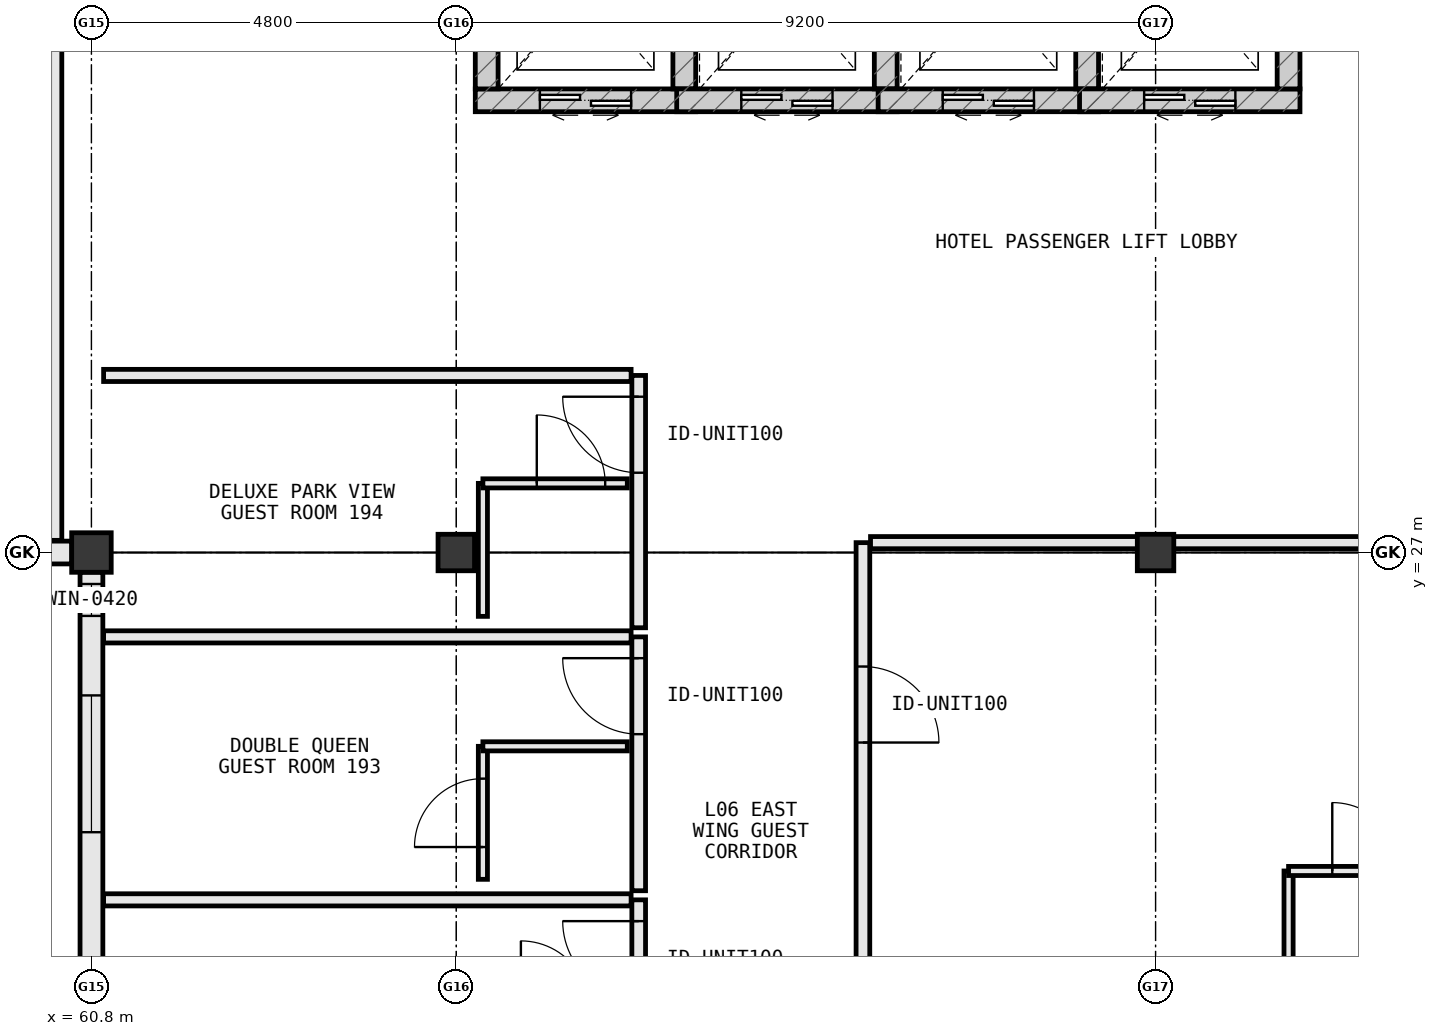
"""IFC4 building model, lengths in metres.
Left out: names, types, materials, properties, quantities, classifications, styles, units other than length and angle.
Written with IfcOpenShell. Run it as: python <this file> out.ifc"""

import sys

from ifc_helpers import new_model, si_unit, direction, frame, frame_2d, origin, origin_2d, place, context, subcontext, project, spatial, rectangle, extrude, element, fill, save


model = new_model("IFC4")
c1 = context("Model", 3, precision=1e-05, world=origin(), true_north=direction((0.0, 1.0)))
c2 = subcontext(c1, "Body", "Model", "MODEL_VIEW")
j1 = project(units=[si_unit("LENGTHUNIT", "METRE"), si_unit("PLANEANGLEUNIT", "RADIAN")], contexts=[c1])
p1 = place(None, origin())
s1 = spatial("IfcSite", under=j1, at=p1, CompositionType="ELEMENT")
p2 = place(p1, origin())
s2 = spatial("IfcBuilding", under=s1, at=p2, CompositionType="ELEMENT")
p3 = place(p2, frame((0.0, 0.0, 27.6)))
s3 = spatial("IfcBuildingStorey", under=s2, at=p3, CompositionType="ELEMENT", Elevation=27.6)
p4 = place(p3, frame((60.8, 27.0, 0.0), z_axis=(0.0, 0.0, 1.0), x_axis=(1.0, 0.0, 0.0)))
e1 = element("IfcColumn", 1, at=p4, inside=s3, PredefinedType="COLUMN", context=c2, shape_type="SweptSolid", body=[
    extrude(rectangle(XDim=0.52, YDim=0.52, at=origin_2d()), origin(), (0.0, 0.0, 1.0), 3.8),
])
for number, where, z_axis, x_axis in (
    (2, (74.8, 27.0, 0.0), (0.0, 0.0, 1.0), (1.0, 0.0, 0.0)),
    (3, (65.6, 27.0, 0.0), (0.0, 0.0, 1.0), (1.0, 0.0, 0.0)),
):
    element("IfcColumn", number, at=place(p3, frame(where, z_axis=z_axis, x_axis=x_axis)), inside=s3, PredefinedType="COLUMN", context=c2, shape_type="SweptSolid", body=[
        extrude(rectangle(XDim=0.48, YDim=0.48, at=origin_2d()), origin(), (0.0, 0.0, 1.0), 3.8),
    ])
p5 = place(p3, frame((51.423, 27.0, 0.0), z_axis=(0.0, 0.0, 1.0), x_axis=(1.0, 0.0, 0.0)))
e4 = element("IfcWall", 4, at=p5, inside=s3, PredefinedType="STANDARD", context=c2, shape_type="SweptSolid", body=[
    extrude(rectangle(XDim=9.119, YDim=0.3, at=frame_2d((4.56, 0.0))), origin(), (0.0, 0.0, 1.0), 2.83),
])
p6 = place(p5, frame((1.68, 0.0, 0.85)))
e5 = element("IfcOpeningElement", 5, at=p6, cuts=e4, PredefinedType="OPENING", context=c2, shape_type="SweptSolid", body=[
    extrude(rectangle(XDim=1.2, YDim=1.55, at=frame_2d((0.6, 0.775))), frame((0.0, 0.162, 0.0), z_axis=(0.0, -1.0, 0.0), x_axis=(1.0, 0.0, 0.0)), (0.0, 0.0, 1.0), 0.324),
])
p7 = place(p5, frame((6.239, 0.0, 0.85)))
e6 = element("IfcOpeningElement", 6, at=p7, cuts=e4, PredefinedType="OPENING", context=c2, shape_type="SweptSolid", body=[
    extrude(rectangle(XDim=1.2, YDim=1.55, at=frame_2d((0.6, 0.775))), frame((0.0, 0.162, 0.0), z_axis=(0.0, -1.0, 0.0), x_axis=(1.0, 0.0, 0.0)), (0.0, 0.0, 1.0), 0.324),
])
p8 = place(p3, frame((60.8, 26.742, 0.0), z_axis=(0.0, 0.0, 1.0), x_axis=(0.0, -1.0, 0.0)))
e7 = element("IfcWall", 7, at=p8, inside=s3, PredefinedType="STANDARD", context=c2, shape_type="SweptSolid", body=[
    extrude(rectangle(XDim=7.884, YDim=0.3, at=frame_2d((3.942, 0.0))), origin(), (0.0, 0.0, 1.0), 3.01),
])
p9 = place(p8, frame((5.082, 0.0, 0.85)))
e8 = element("IfcOpeningElement", 8, at=p9, cuts=e7, PredefinedType="OPENING", context=c2, shape_type="SweptSolid", body=[
    extrude(rectangle(XDim=1.8, YDim=1.85, at=frame_2d((0.9, 0.925))), frame((0.0, 0.162, 0.0), z_axis=(0.0, -1.0, 0.0), x_axis=(1.0, 0.0, 0.0)), (0.0, 0.0, 1.0), 0.324),
])
p10 = place(p8, frame((1.622, 0.0, 0.85)))
e9 = element("IfcOpeningElement", 9, at=p10, cuts=e7, PredefinedType="OPENING", context=c2, shape_type="SweptSolid", body=[
    extrude(rectangle(XDim=1.8, YDim=1.85, at=frame_2d((0.9, 0.925))), frame((0.0, 0.162, 0.0), z_axis=(0.0, -1.0, 0.0), x_axis=(1.0, 0.0, 0.0)), (0.0, 0.0, 1.0), 0.324),
])
p11 = place(p8, frame((0.156, 0.0, 0.85)))
e10 = element("IfcOpeningElement", 10, at=p11, cuts=e7, PredefinedType="OPENING", context=c2, shape_type="SweptSolid", body=[
    extrude(rectangle(XDim=0.42, YDim=1.4, at=frame_2d((0.21, 0.7))), frame((0.0, 0.162, 0.0), z_axis=(0.0, -1.0, 0.0), x_axis=(1.0, 0.0, 0.0)), (0.0, 0.0, 1.0), 0.324),
])
p12 = place(p3, frame((65.85, 32.95, 0.0), z_axis=(0.0, 0.0, 1.0), x_axis=(1.0, 0.0, 0.0)))
e11 = element("IfcWall", 11, at=p12, inside=s3, PredefinedType="SHEAR", context=c2, shape_type="SweptSolid", body=[
    extrude(rectangle(XDim=2.9, YDim=0.3, at=frame_2d((1.45, 0.0))), origin(), (0.0, 0.0, 1.0), 3.8),
])
p13 = place(p12, frame((0.85, 0.0, 0.0)))
e12 = element("IfcOpeningElement", 12, at=p13, cuts=e11, PredefinedType="OPENING", context=c2, shape_type="SweptSolid", body=[
    extrude(rectangle(XDim=1.2, YDim=2.2, at=frame_2d((0.6, 1.1))), frame((0.0, 0.162, 0.0), z_axis=(0.0, -1.0, 0.0), x_axis=(1.0, 0.0, 0.0)), (0.0, 0.0, 1.0), 0.324),
])
for number, where, z_axis, x_axis in (
    (13, (68.6, 33.1, 0.0), (0.0, 0.0, 1.0), (0.0, 1.0, 0.0)),
    (14, (66.0, 35.7, 0.0), (0.0, 0.0, 1.0), (0.0, -1.0, 0.0)),
):
    element("IfcWall", number, at=place(p3, frame(where, z_axis=z_axis, x_axis=x_axis)), inside=s3, PredefinedType="SHEAR", context=c2, shape_type="SweptSolid", body=[
        extrude(rectangle(XDim=2.6, YDim=0.3, at=frame_2d((1.3, 0.0))), origin(), (0.0, 0.0, 1.0), 3.8),
    ])
p14 = place(p3, frame((68.5, 32.95, 0.0), z_axis=(0.0, 0.0, 1.0), x_axis=(1.0, 0.0, 0.0)))
e15 = element("IfcWall", 15, at=p14, inside=s3, PredefinedType="SHEAR", context=c2, shape_type="SweptSolid", body=[
    extrude(rectangle(XDim=2.9, YDim=0.3, at=frame_2d((1.45, 0.0))), origin(), (0.0, 0.0, 1.0), 3.8),
])
p15 = place(p14, frame((0.85, 0.0, 0.0)))
e16 = element("IfcOpeningElement", 16, at=p15, cuts=e15, PredefinedType="OPENING", context=c2, shape_type="SweptSolid", body=[
    extrude(rectangle(XDim=1.2, YDim=2.2, at=frame_2d((0.6, 1.1))), frame((0.0, 0.162, 0.0), z_axis=(0.0, -1.0, 0.0), x_axis=(1.0, 0.0, 0.0)), (0.0, 0.0, 1.0), 0.324),
])
p16 = place(p3, frame((71.25, 33.1, 0.0), z_axis=(0.0, 0.0, 1.0), x_axis=(0.0, 1.0, 0.0)))
e17 = element("IfcWall", 17, at=p16, inside=s3, PredefinedType="SHEAR", context=c2, shape_type="SweptSolid", body=[
    extrude(rectangle(XDim=2.6, YDim=0.3, at=frame_2d((1.3, 0.0))), origin(), (0.0, 0.0, 1.0), 3.8),
])
p17 = place(p3, frame((71.15, 32.95, 0.0), z_axis=(0.0, 0.0, 1.0), x_axis=(1.0, 0.0, 0.0)))
e18 = element("IfcWall", 18, at=p17, inside=s3, PredefinedType="SHEAR", context=c2, shape_type="SweptSolid", body=[
    extrude(rectangle(XDim=2.9, YDim=0.3, at=frame_2d((1.45, 0.0))), origin(), (0.0, 0.0, 1.0), 3.8),
])
p18 = place(p17, frame((0.85, 0.0, 0.0)))
e19 = element("IfcOpeningElement", 19, at=p18, cuts=e18, PredefinedType="OPENING", context=c2, shape_type="SweptSolid", body=[
    extrude(rectangle(XDim=1.2, YDim=2.2, at=frame_2d((0.6, 1.1))), frame((0.0, 0.162, 0.0), z_axis=(0.0, -1.0, 0.0), x_axis=(1.0, 0.0, 0.0)), (0.0, 0.0, 1.0), 0.324),
])
p19 = place(p3, frame((73.9, 33.1, 0.0), z_axis=(0.0, 0.0, 1.0), x_axis=(0.0, 1.0, 0.0)))
e20 = element("IfcWall", 20, at=p19, inside=s3, PredefinedType="SHEAR", context=c2, shape_type="SweptSolid", body=[
    extrude(rectangle(XDim=2.6, YDim=0.3, at=frame_2d((1.3, 0.0))), origin(), (0.0, 0.0, 1.0), 3.8),
])
p20 = place(p3, frame((73.8, 32.95, 0.0), z_axis=(0.0, 0.0, 1.0), x_axis=(1.0, 0.0, 0.0)))
e21 = element("IfcWall", 21, at=p20, inside=s3, PredefinedType="SHEAR", context=c2, shape_type="SweptSolid", body=[
    extrude(rectangle(XDim=2.9, YDim=0.3, at=frame_2d((1.45, 0.0))), origin(), (0.0, 0.0, 1.0), 3.8),
])
p21 = place(p20, frame((0.85, 0.0, 0.0)))
e22 = element("IfcOpeningElement", 22, at=p21, cuts=e21, PredefinedType="OPENING", context=c2, shape_type="SweptSolid", body=[
    extrude(rectangle(XDim=1.2, YDim=2.2, at=frame_2d((0.6, 1.1))), frame((0.0, 0.162, 0.0), z_axis=(0.0, -1.0, 0.0), x_axis=(1.0, 0.0, 0.0)), (0.0, 0.0, 1.0), 0.324),
])
p22 = place(p3, frame((76.55, 33.1, 0.0), z_axis=(0.0, 0.0, 1.0), x_axis=(0.0, 1.0, 0.0)))
e23 = element("IfcWall", 23, at=p22, inside=s3, PredefinedType="SHEAR", context=c2, shape_type="SweptSolid", body=[
    extrude(rectangle(XDim=2.6, YDim=0.3, at=frame_2d((1.3, 0.0))), origin(), (0.0, 0.0, 1.0), 3.8),
])
p23 = place(p3, frame((68.0, 19.09, 0.0), z_axis=(0.0, 0.0, 1.0), x_axis=(0.0, 1.0, 0.0)))
e24 = element("IfcWall", 24, at=p23, inside=s3, PredefinedType="PARTITIONING", context=c2, shape_type="SweptSolid", body=[
    extrude(rectangle(XDim=3.34, YDim=0.18, at=frame_2d((1.67, 0.0))), origin(), (0.0, 0.0, 1.0), 3.555),
])
p24 = place(p23, frame((2.06, 0.0, 0.0)))
e25 = element("IfcOpeningElement", 25, at=p24, cuts=e24, PredefinedType="OPENING", context=c2, shape_type="SweptSolid", body=[
    extrude(rectangle(XDim=1.0, YDim=2.2, at=frame_2d((0.5, 1.1))), frame((0.0, 0.102, 0.0), z_axis=(0.0, -1.0, 0.0), x_axis=(1.0, 0.0, 0.0)), (0.0, 0.0, 1.0), 0.204),
])
p25 = place(p3, frame((60.96, 22.43, 0.0), z_axis=(0.0, 0.0, 1.0), x_axis=(1.0, 0.0, 0.0)))
e26 = element("IfcWall", 26, at=p25, inside=s3, PredefinedType="PARTITIONING", context=c2, shape_type="SweptSolid", body=[
    extrude(rectangle(XDim=6.94, YDim=0.16, at=frame_2d((3.47, 0.0))), origin(), (0.0, 0.0, 1.0), 3.555),
])
p26 = place(p3, frame((68.0, 22.55, 0.0), z_axis=(0.0, 0.0, 1.0), x_axis=(0.0, 1.0, 0.0)))
e27 = element("IfcWall", 27, at=p26, inside=s3, PredefinedType="PARTITIONING", context=c2, shape_type="SweptSolid", body=[
    extrude(rectangle(XDim=3.34, YDim=0.18, at=frame_2d((1.67, 0.0))), origin(), (0.0, 0.0, 1.0), 3.555),
])
p27 = place(p26, frame((2.06, 0.0, 0.0)))
e28 = element("IfcOpeningElement", 28, at=p27, cuts=e27, PredefinedType="OPENING", context=c2, shape_type="SweptSolid", body=[
    extrude(rectangle(XDim=1.0, YDim=2.2, at=frame_2d((0.5, 1.1))), frame((0.0, 0.102, 0.0), z_axis=(0.0, -1.0, 0.0), x_axis=(1.0, 0.0, 0.0)), (0.0, 0.0, 1.0), 0.204),
])
p28 = place(p3, frame((60.96, 25.89, 0.0), z_axis=(0.0, 0.0, 1.0), x_axis=(1.0, 0.0, 0.0)))
e29 = element("IfcWall", 29, at=p28, inside=s3, PredefinedType="PARTITIONING", context=c2, shape_type="SweptSolid", body=[
    extrude(rectangle(XDim=6.94, YDim=0.16, at=frame_2d((3.47, 0.0))), origin(), (0.0, 0.0, 1.0), 3.555),
])
p29 = place(p3, frame((65.95, 22.7, 0.0), z_axis=(0.0, 0.0, 1.0), x_axis=(0.0, 1.0, 0.0)))
e30 = element("IfcWall", 30, at=p29, inside=s3, PredefinedType="PARTITIONING", context=c2, shape_type="SweptSolid", body=[
    extrude(rectangle(XDim=1.75, YDim=0.12, at=frame_2d((0.875, 0.0))), origin(), (0.0, 0.0, 1.0), 3.01),
])
p30 = place(p29, frame((0.425, 0.0, 0.0)))
e31 = element("IfcOpeningElement", 31, at=p30, cuts=e30, PredefinedType="OPENING", context=c2, shape_type="SweptSolid", body=[
    extrude(rectangle(XDim=0.9, YDim=2.15, at=frame_2d((0.45, 1.075))), frame((0.0, 0.072, 0.0), z_axis=(0.0, -1.0, 0.0), x_axis=(1.0, 0.0, 0.0)), (0.0, 0.0, 1.0), 0.144),
])
p31 = place(p3, frame((65.95, 24.45, 0.0), z_axis=(0.0, 0.0, 1.0), x_axis=(1.0, 0.0, 0.0)))
e32 = element("IfcWall", 32, at=p31, inside=s3, PredefinedType="PARTITIONING", context=c2, shape_type="SweptSolid", body=[
    extrude(rectangle(XDim=1.9, YDim=0.12, at=frame_2d((0.95, 0.0))), origin(), (0.0, 0.0, 1.0), 3.555),
])
p32 = place(p3, frame((68.0, 26.01, 0.0), z_axis=(0.0, 0.0, 1.0), x_axis=(0.0, 1.0, 0.0)))
e33 = element("IfcWall", 33, at=p32, inside=s3, PredefinedType="PARTITIONING", context=c2, shape_type="SweptSolid", body=[
    extrude(rectangle(XDim=3.32, YDim=0.18, at=frame_2d((1.66, 0.0))), origin(), (0.0, 0.0, 1.0), 3.555),
])
p33 = place(p32, frame((2.04, 0.0, 0.0)))
e34 = element("IfcOpeningElement", 34, at=p33, cuts=e33, PredefinedType="OPENING", context=c2, shape_type="SweptSolid", body=[
    extrude(rectangle(XDim=1.0, YDim=2.2, at=frame_2d((0.5, 1.1))), frame((0.0, 0.102, 0.0), z_axis=(0.0, -1.0, 0.0), x_axis=(1.0, 0.0, 0.0)), (0.0, 0.0, 1.0), 0.204),
])
p34 = place(p3, frame((60.96, 29.33, 0.0), z_axis=(0.0, 0.0, 1.0), x_axis=(1.0, 0.0, 0.0)))
e35 = element("IfcWall", 35, at=p34, inside=s3, PredefinedType="PARTITIONING", context=c2, shape_type="SweptSolid", body=[
    extrude(rectangle(XDim=6.94, YDim=0.16, at=frame_2d((3.47, 0.0))), origin(), (0.0, 0.0, 1.0), 3.555),
])
p35 = place(p3, frame((65.95, 26.16, 0.0), z_axis=(0.0, 0.0, 1.0), x_axis=(0.0, 1.0, 0.0)))
e36 = element("IfcWall", 36, at=p35, inside=s3, PredefinedType="PARTITIONING", context=c2, shape_type="SweptSolid", body=[
    extrude(rectangle(XDim=1.75, YDim=0.12, at=frame_2d((0.875, 0.0))), origin(), (0.0, 0.0, 1.0), 2.93),
])
p36 = place(p3, frame((65.95, 27.91, 0.0), z_axis=(0.0, 0.0, 1.0), x_axis=(1.0, 0.0, 0.0)))
e37 = element("IfcWall", 37, at=p36, inside=s3, PredefinedType="PARTITIONING", context=c2, shape_type="SweptSolid", body=[
    extrude(rectangle(XDim=1.9, YDim=0.12, at=frame_2d((0.95, 0.0))), origin(), (0.0, 0.0, 1.0), 3.555),
])
p37 = place(p36, frame((0.709, 0.0, 0.0)))
e38 = element("IfcOpeningElement", 38, at=p37, cuts=e37, PredefinedType="OPENING", context=c2, shape_type="SweptSolid", body=[
    extrude(rectangle(XDim=0.9, YDim=2.15, at=frame_2d((0.45, 1.075))), frame((0.0, 0.072, 0.0), z_axis=(0.0, -1.0, 0.0), x_axis=(1.0, 0.0, 0.0)), (0.0, 0.0, 1.0), 0.144),
])
p38 = place(p3, frame((70.95, 27.13, 0.0), z_axis=(0.0, 0.0, 1.0), x_axis=(0.0, -1.0, 0.0)))
e39 = element("IfcWall", 39, at=p38, inside=s3, PredefinedType="PARTITIONING", context=c2, shape_type="SweptSolid", body=[
    extrude(rectangle(XDim=6.22, YDim=0.18, at=frame_2d((3.11, 0.0))), origin(), (0.0, 0.0, 1.0), 3.555),
])
p39 = place(p38, frame((1.63, 0.0, 0.0)))
e40 = element("IfcOpeningElement", 40, at=p39, cuts=e39, PredefinedType="OPENING", context=c2, shape_type="SweptSolid", body=[
    extrude(rectangle(XDim=1.0, YDim=2.2, at=frame_2d((0.5, 1.1))), frame((0.0, 0.102, 0.0), z_axis=(0.0, -1.0, 0.0), x_axis=(1.0, 0.0, 0.0)), (0.0, 0.0, 1.0), 0.204),
])
p40 = place(p3, frame((71.05, 27.13, 0.0), z_axis=(0.0, 0.0, 1.0), x_axis=(1.0, 0.0, 0.0)))
e41 = element("IfcWall", 41, at=p40, inside=s3, PredefinedType="PARTITIONING", context=c2, shape_type="SweptSolid", body=[
    extrude(rectangle(XDim=12.79, YDim=0.16, at=frame_2d((6.395, 0.0))), origin(), (0.0, 0.0, 1.0), 2.93),
])
p41 = place(p3, frame((76.55, 21.06, 0.0), z_axis=(0.0, 0.0, 1.0), x_axis=(0.0, 1.0, 0.0)))
e42 = element("IfcWall", 42, at=p41, inside=s3, PredefinedType="PARTITIONING", context=c2, shape_type="SweptSolid", body=[
    extrude(rectangle(XDim=1.75, YDim=0.12, at=frame_2d((0.875, 0.0))), origin(), (0.0, 0.0, 1.0), 3.555),
])
p42 = place(p3, frame((76.55, 22.81, 0.0), z_axis=(0.0, 0.0, 1.0), x_axis=(1.0, 0.0, 0.0)))
e43 = element("IfcWall", 43, at=p42, inside=s3, PredefinedType="PARTITIONING", context=c2, shape_type="SweptSolid", body=[
    extrude(rectangle(XDim=2.05, YDim=0.12, at=frame_2d((1.025, 0.0))), origin(), (0.0, 0.0, 1.0), 3.555),
])
p43 = place(p42, frame((0.575, 0.0, 0.0)))
e44 = element("IfcOpeningElement", 44, at=p43, cuts=e43, PredefinedType="OPENING", context=c2, shape_type="SweptSolid", body=[
    extrude(rectangle(XDim=0.9, YDim=2.15, at=frame_2d((0.45, 1.075))), frame((0.0, 0.072, 0.0), z_axis=(0.0, -1.0, 0.0), x_axis=(1.0, 0.0, 0.0)), (0.0, 0.0, 1.0), 0.144),
])
p44 = place(p3, frame((60.33, 27.16, 0.0), z_axis=(0.0, 0.0, 1.0), x_axis=(0.0, 1.0, 0.0)))
e45 = element("IfcWall", 45, at=p44, inside=s3, PredefinedType="PARTITIONING", context=c2, shape_type="SweptSolid", body=[
    extrude(rectangle(XDim=10.34, YDim=0.16, at=frame_2d((5.17, 0.0))), origin(), (0.0, 0.0, 1.0), 3.555),
])
p45 = place(p10, origin())
e46 = element("IfcWindow", 46, at=p45, inside=s3, PartitioningType="SINGLE_PANEL", PredefinedType="WINDOW", context=c2, shape_type="SweptSolid", body=[
    extrude(rectangle(XDim=1.8, YDim=1.85, at=frame_2d((0.9, 0.925))), frame((0.0, 0.03, 0.0), z_axis=(0.0, -1.0, 0.0), x_axis=(1.0, 0.0, 0.0)), (0.0, 0.0, 1.0), 0.06),
])
fill(e9, e46)
p46 = place(p11, origin())
e47 = element("IfcWindow", 47, at=p46, inside=s3, PartitioningType="SINGLE_PANEL", PredefinedType="WINDOW", context=c2, shape_type="SweptSolid", body=[
    extrude(rectangle(XDim=0.42, YDim=1.4, at=frame_2d((0.21, 0.7))), frame((0.0, 0.03, 0.0), z_axis=(0.0, -1.0, 0.0), x_axis=(1.0, 0.0, 0.0)), (0.0, 0.0, 1.0), 0.06),
])
fill(e10, e47)
p47 = place(p13, origin())
e48 = element("IfcDoor", 48, at=p47, inside=s3, OperationType="DOUBLE_DOOR_SLIDING", PredefinedType="DOOR", context=c2, shape_type="SweptSolid", body=[
    extrude(rectangle(XDim=1.2, YDim=2.2, at=frame_2d((0.6, 1.1))), frame((0.0, 0.025, 0.0), z_axis=(0.0, -1.0, 0.0), x_axis=(1.0, 0.0, 0.0)), (0.0, 0.0, 1.0), 0.05),
])
fill(e12, e48)
p48 = place(p15, origin())
e49 = element("IfcDoor", 49, at=p48, inside=s3, OperationType="DOUBLE_DOOR_SLIDING", PredefinedType="DOOR", context=c2, shape_type="SweptSolid", body=[
    extrude(rectangle(XDim=1.2, YDim=2.2, at=frame_2d((0.6, 1.1))), frame((0.0, 0.025, 0.0), z_axis=(0.0, -1.0, 0.0), x_axis=(1.0, 0.0, 0.0)), (0.0, 0.0, 1.0), 0.05),
])
fill(e16, e49)
p49 = place(p18, origin())
e50 = element("IfcDoor", 50, at=p49, inside=s3, OperationType="DOUBLE_DOOR_SLIDING", PredefinedType="DOOR", context=c2, shape_type="SweptSolid", body=[
    extrude(rectangle(XDim=1.2, YDim=2.2, at=frame_2d((0.6, 1.1))), frame((0.0, 0.025, 0.0), z_axis=(0.0, -1.0, 0.0), x_axis=(1.0, 0.0, 0.0)), (0.0, 0.0, 1.0), 0.05),
])
fill(e19, e50)
p50 = place(p21, origin())
e51 = element("IfcDoor", 51, at=p50, inside=s3, OperationType="DOUBLE_DOOR_SLIDING", PredefinedType="DOOR", context=c2, shape_type="SweptSolid", body=[
    extrude(rectangle(XDim=1.2, YDim=2.2, at=frame_2d((0.6, 1.1))), frame((0.0, 0.025, 0.0), z_axis=(0.0, -1.0, 0.0), x_axis=(1.0, 0.0, 0.0)), (0.0, 0.0, 1.0), 0.05),
])
fill(e22, e51)
p51 = place(p24, origin())
e52 = element("IfcDoor", 52, at=p51, inside=s3, OperationType="SINGLE_SWING_RIGHT", PredefinedType="DOOR", context=c2, shape_type="SweptSolid", body=[
    extrude(rectangle(XDim=1.0, YDim=2.2, at=frame_2d((0.5, 1.1))), frame((0.0, 0.025, 0.0), z_axis=(0.0, -1.0, 0.0), x_axis=(1.0, 0.0, 0.0)), (0.0, 0.0, 1.0), 0.05),
])
fill(e25, e52)
p52 = place(p27, origin())
e53 = element("IfcDoor", 53, at=p52, inside=s3, OperationType="SINGLE_SWING_RIGHT", PredefinedType="DOOR", context=c2, shape_type="SweptSolid", body=[
    extrude(rectangle(XDim=1.0, YDim=2.2, at=frame_2d((0.5, 1.1))), frame((0.0, 0.025, 0.0), z_axis=(0.0, -1.0, 0.0), x_axis=(1.0, 0.0, 0.0)), (0.0, 0.0, 1.0), 0.05),
])
fill(e28, e53)
p53 = place(p30, origin())
e54 = element("IfcDoor", 54, at=p53, inside=s3, OperationType="SINGLE_SWING_LEFT", PredefinedType="DOOR", context=c2, shape_type="SweptSolid", body=[
    extrude(rectangle(XDim=0.9, YDim=2.15, at=frame_2d((0.45, 1.075))), frame((0.0, 0.025, 0.0), z_axis=(0.0, -1.0, 0.0), x_axis=(1.0, 0.0, 0.0)), (0.0, 0.0, 1.0), 0.05),
])
fill(e31, e54)
p54 = place(p33, origin())
e55 = element("IfcDoor", 55, at=p54, inside=s3, OperationType="SINGLE_SWING_RIGHT", PredefinedType="DOOR", context=c2, shape_type="SweptSolid", body=[
    extrude(rectangle(XDim=1.0, YDim=2.2, at=frame_2d((0.5, 1.1))), frame((0.0, 0.025, 0.0), z_axis=(0.0, -1.0, 0.0), x_axis=(1.0, 0.0, 0.0)), (0.0, 0.0, 1.0), 0.05),
])
fill(e34, e55)
p55 = place(p37, origin())
e56 = element("IfcDoor", 56, at=p55, inside=s3, OperationType="SINGLE_SWING_LEFT", PredefinedType="DOOR", context=c2, shape_type="SweptSolid", body=[
    extrude(rectangle(XDim=0.9, YDim=2.15, at=frame_2d((0.45, 1.075))), frame((0.0, 0.025, 0.0), z_axis=(0.0, -1.0, 0.0), x_axis=(1.0, 0.0, 0.0)), (0.0, 0.0, 1.0), 0.05),
])
fill(e38, e56)
p56 = place(p39, origin())
e57 = element("IfcDoor", 57, at=p56, inside=s3, OperationType="SINGLE_SWING_RIGHT", PredefinedType="DOOR", context=c2, shape_type="SweptSolid", body=[
    extrude(rectangle(XDim=1.0, YDim=2.2, at=frame_2d((0.5, 1.1))), frame((0.0, 0.025, 0.0), z_axis=(0.0, -1.0, 0.0), x_axis=(1.0, 0.0, 0.0)), (0.0, 0.0, 1.0), 0.05),
])
fill(e40, e57)
p57 = place(p43, origin())
e58 = element("IfcDoor", 58, at=p57, inside=s3, OperationType="SINGLE_SWING_LEFT", PredefinedType="DOOR", context=c2, shape_type="SweptSolid", body=[
    extrude(rectangle(XDim=0.9, YDim=2.15, at=frame_2d((0.45, 1.075))), frame((0.0, 0.025, 0.0), z_axis=(0.0, -1.0, 0.0), x_axis=(1.0, 0.0, 0.0)), (0.0, 0.0, 1.0), 0.05),
])
fill(e44, e58)
save(model, sys.argv[1])
